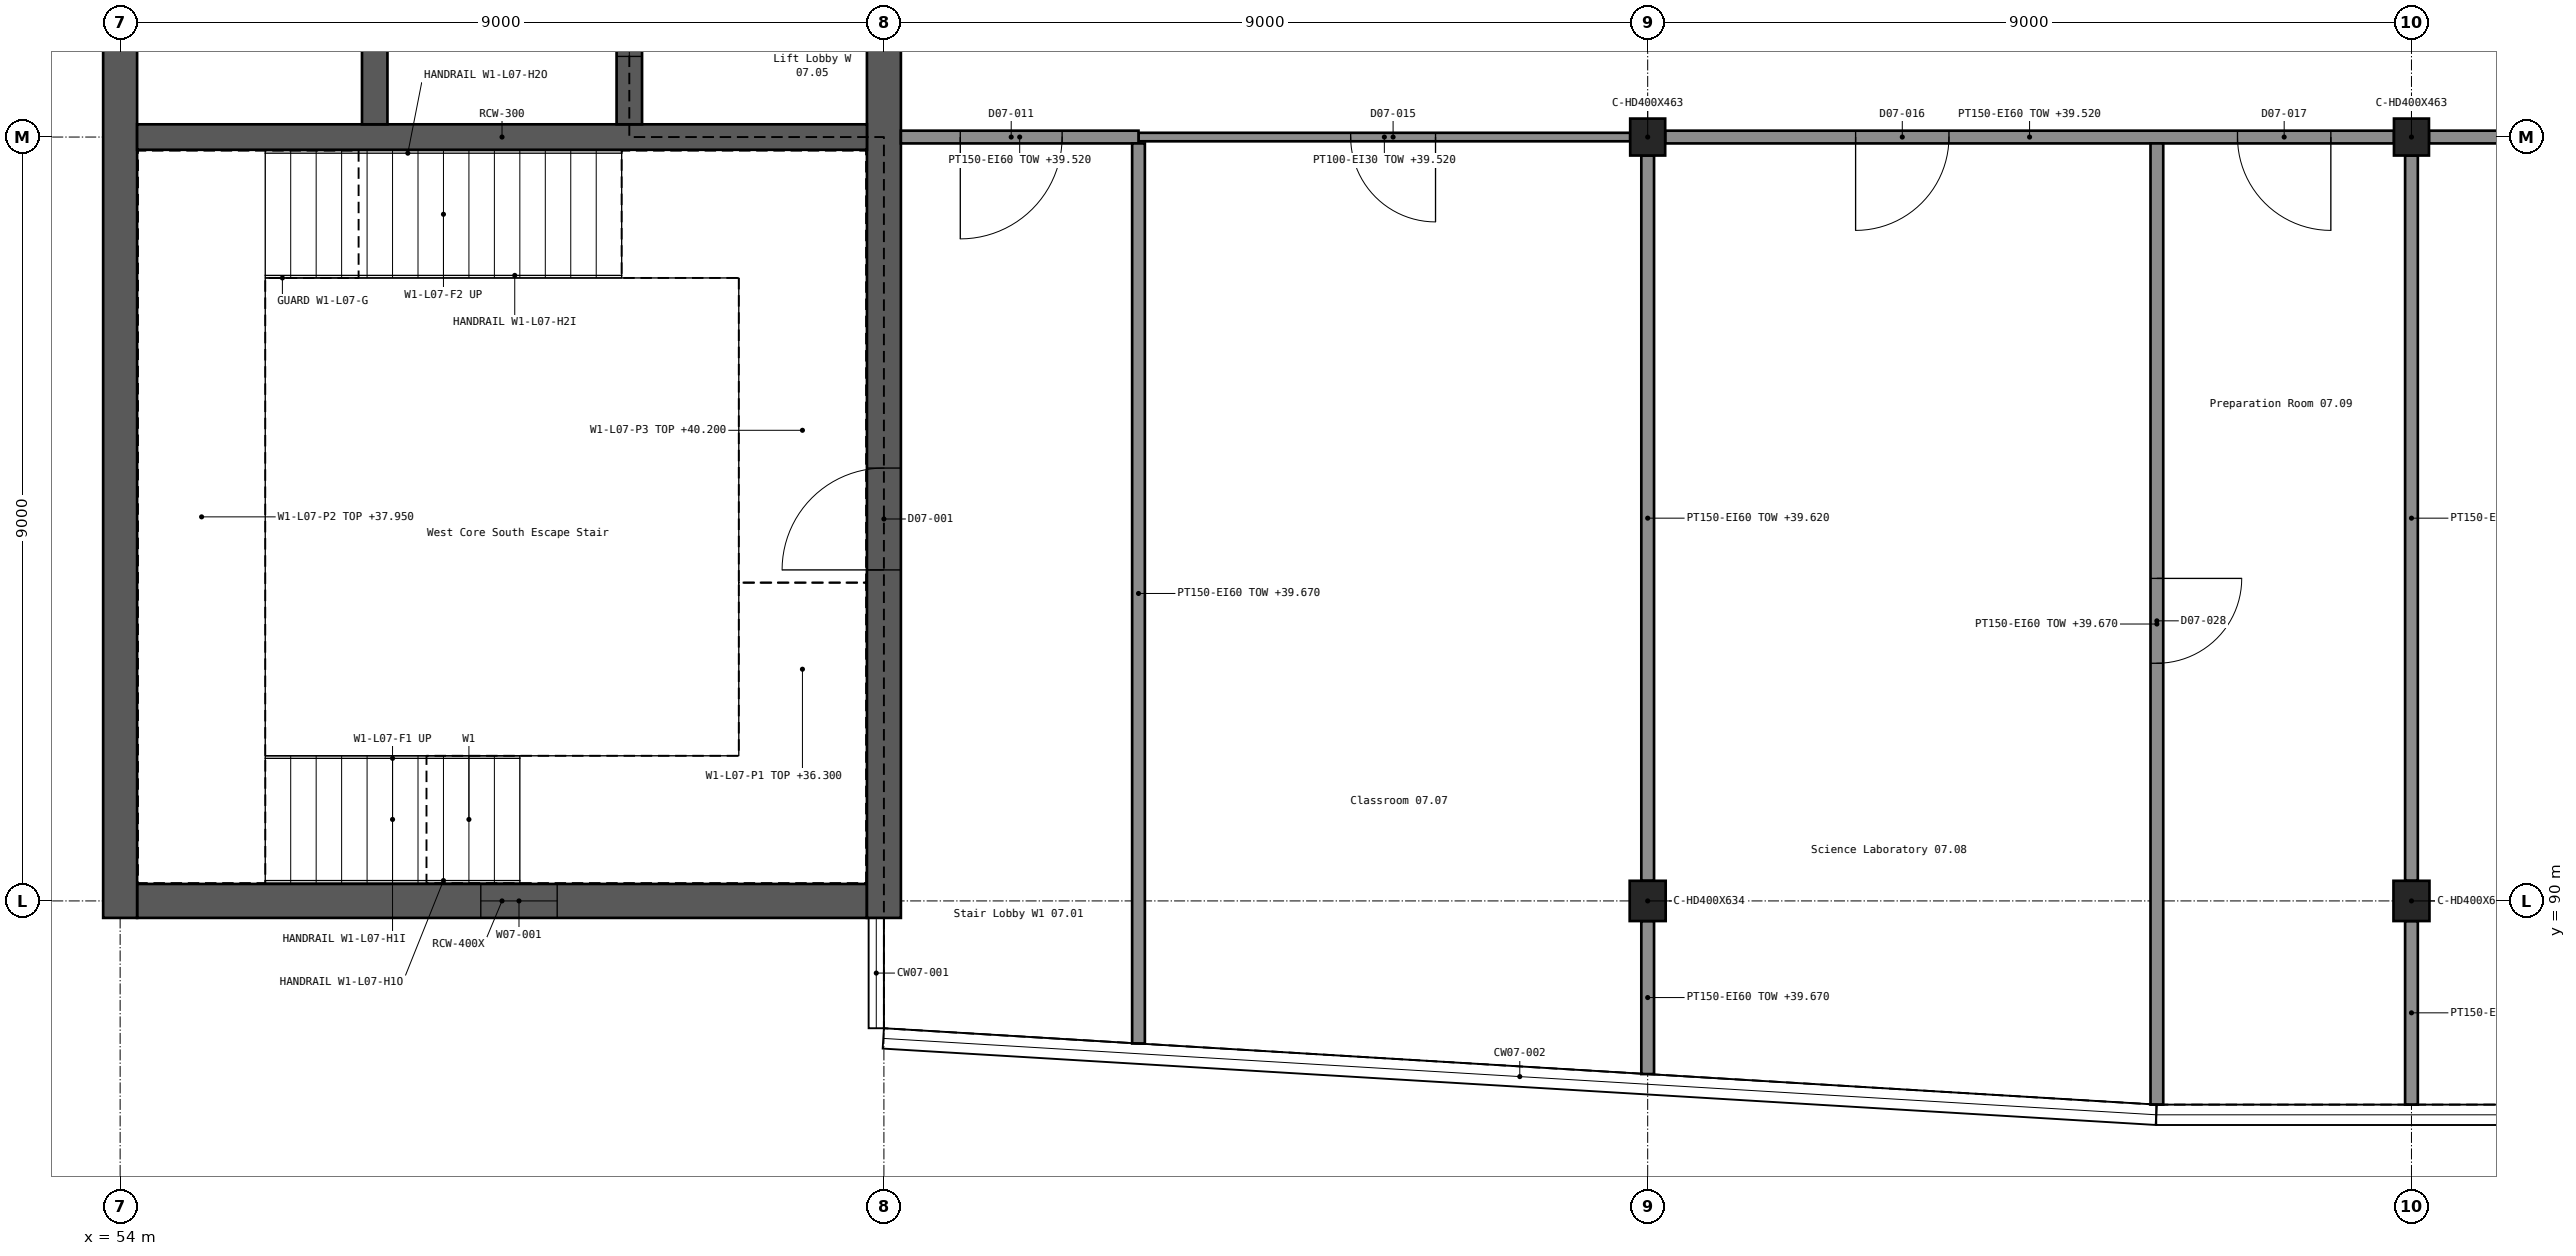
"""IFC4 building model, lengths in metres.
Left out: names, types, materials, properties, quantities, classifications, styles, units other than length and angle.
Written with IfcOpenShell. Run it as: python <this file> out.ifc"""

import sys

from ifc_helpers import new_model, si_unit, direction, frame, frame_2d, origin, origin_2d, place, context, subcontext, project, spatial, rectangle, i_section, extrude, element, fill, save


model = new_model("IFC4")
c1 = context("Model", 3, precision=1e-05, world=origin(), true_north=direction((0.0, 1.0)))
c2 = subcontext(c1, "Body", "Model", "MODEL_VIEW")
j1 = project(units=[si_unit("LENGTHUNIT", "METRE"), si_unit("PLANEANGLEUNIT", "RADIAN")], contexts=[c1])
p1 = place(None, origin())
s1 = spatial("IfcSite", under=j1, at=p1, CompositionType="ELEMENT")
p2 = place(p1, origin())
s2 = spatial("IfcBuilding", under=s1, at=p2, CompositionType="ELEMENT")
p3 = place(p2, frame((0.0, 0.0, 36.3)))
s3 = spatial("IfcBuildingStorey", under=s2, at=p3, CompositionType="ELEMENT", Elevation=36.3)
p4 = place(p3, frame((54.2, 90.0, 0.0), z_axis=(0.0, 0.0, 1.0), x_axis=(1.0, 0.0, 0.0)))
e1 = element("IfcWall", 1, at=p4, inside=s3, PredefinedType="SHEAR", context=c2, shape_type="SweptSolid", body=[
    extrude(rectangle(XDim=8.6, YDim=0.4, at=frame_2d((4.3, 0.0))), origin(), (0.0, 0.0, 1.0), 3.9),
])
p5 = place(p4, frame((4.05, 0.0, 1.2)))
e2 = element("IfcOpeningElement", 2, at=p5, cuts=e1, PredefinedType="OPENING", context=c2, shape_type="SweptSolid", body=[
    extrude(rectangle(XDim=0.9, YDim=1.5, at=frame_2d((0.45, 0.75))), frame((0.0, 0.211, 0.0), z_axis=(0.0, -1.0, 0.0), x_axis=(1.0, 0.0, 0.0)), (0.0, 0.0, 1.0), 0.422),
])
p6 = place(p3, frame((54.0, 89.8, 0.0), z_axis=(0.0, 0.0, 1.0), x_axis=(0.0, 1.0, 0.0)))
e3 = element("IfcWall", 3, at=p6, inside=s3, PredefinedType="SHEAR", context=c2, shape_type="SweptSolid", body=[
    extrude(rectangle(XDim=27.4, YDim=0.4, at=frame_2d((13.7, 0.0))), origin(), (0.0, 0.0, 1.0), 3.9),
])
p7 = place(p3, frame((63.0, 89.8, 0.0), z_axis=(0.0, 0.0, 1.0), x_axis=(0.0, 1.0, 0.0)))
e4 = element("IfcWall", 4, at=p7, inside=s3, PredefinedType="SHEAR", context=c2, shape_type="SweptSolid", body=[
    extrude(rectangle(XDim=27.4, YDim=0.4, at=frame_2d((13.7, 0.0))), origin(), (0.0, 0.0, 1.0), 3.9),
])
p8 = place(p7, frame((4.1, 0.0, 0.0)))
e5 = element("IfcOpeningElement", 5, at=p8, cuts=e4, PredefinedType="OPENING", context=c2, shape_type="SweptSolid", body=[
    extrude(rectangle(XDim=1.2, YDim=2.1, at=frame_2d((0.6, 1.05))), frame((0.0, 0.211, 0.0), z_axis=(0.0, -1.0, 0.0), x_axis=(1.0, 0.0, 0.0)), (0.0, 0.0, 1.0), 0.422),
])
p9 = place(p7, frame((22.1, 0.0, 0.0)))
e6 = element("IfcOpeningElement", 6, at=p9, cuts=e4, PredefinedType="OPENING", context=c2, shape_type="SweptSolid", body=[
    extrude(rectangle(XDim=1.2, YDim=2.1, at=frame_2d((0.6, 1.05))), frame((0.0, 0.211, 0.0), z_axis=(0.0, -1.0, 0.0), x_axis=(1.0, 0.0, 0.0)), (0.0, 0.0, 1.0), 0.422),
])
p10 = place(p7, frame((12.5, 0.0, 0.0)))
e7 = element("IfcOpeningElement", 7, at=p10, cuts=e4, PredefinedType="OPENING", context=c2, shape_type="SweptSolid", body=[
    extrude(rectangle(XDim=2.0, YDim=2.1, at=frame_2d((1.0, 1.05))), frame((0.0, 0.211, 0.0), z_axis=(0.0, -1.0, 0.0), x_axis=(1.0, 0.0, 0.0)), (0.0, 0.0, 1.0), 0.422),
])
p11 = place(p3, frame((54.2, 99.0, 0.0), z_axis=(0.0, 0.0, 1.0), x_axis=(1.0, 0.0, 0.0)))
e8 = element("IfcWall", 8, at=p11, inside=s3, PredefinedType="SHEAR", context=c2, shape_type="SweptSolid", body=[
    extrude(rectangle(XDim=8.6, YDim=0.3, at=frame_2d((4.3, 0.0))), origin(), (0.0, 0.0, 1.0), 3.9),
])
p12 = place(p3, frame((57.0, 99.15, 0.0), z_axis=(0.0, 0.0, 1.0), x_axis=(0.0, 1.0, 0.0)))
e9 = element("IfcWall", 9, at=p12, inside=s3, PredefinedType="SHEAR", context=c2, shape_type="SweptSolid", body=[
    extrude(rectangle(XDim=8.7, YDim=0.3, at=frame_2d((4.35, 0.0))), origin(), (0.0, 0.0, 1.0), 3.9),
])
p13 = place(p3, frame((60.0, 99.15, 0.0), z_axis=(0.0, 0.0, 1.0), x_axis=(0.0, 1.0, 0.0)))
e10 = element("IfcWall", 10, at=p13, inside=s3, PredefinedType="SHEAR", context=c2, shape_type="SweptSolid", body=[
    extrude(rectangle(XDim=8.7, YDim=0.3, at=frame_2d((4.35, 0.0))), origin(), (0.0, 0.0, 1.0), 3.9),
])
p14 = place(p13, frame((0.8, 0.0, 0.0)))
e11 = element("IfcOpeningElement", 11, at=p14, cuts=e10, PredefinedType="OPENING", context=c2, shape_type="SweptSolid", body=[
    extrude(rectangle(XDim=1.1, YDim=2.1, at=frame_2d((0.55, 1.05))), frame((0.0, 0.161, 0.0), z_axis=(0.0, -1.0, 0.0), x_axis=(1.0, 0.0, 0.0)), (0.0, 0.0, 1.0), 0.322),
])
p15 = place(p13, frame((3.8, 0.0, 0.0)))
e12 = element("IfcOpeningElement", 12, at=p15, cuts=e10, PredefinedType="OPENING", context=c2, shape_type="SweptSolid", body=[
    extrude(rectangle(XDim=1.1, YDim=2.1, at=frame_2d((0.55, 1.05))), frame((0.0, 0.161, 0.0), z_axis=(0.0, -1.0, 0.0), x_axis=(1.0, 0.0, 0.0)), (0.0, 0.0, 1.0), 0.322),
])
p16 = place(p13, frame((6.8, 0.0, 0.0)))
e13 = element("IfcOpeningElement", 13, at=p16, cuts=e10, PredefinedType="OPENING", context=c2, shape_type="SweptSolid", body=[
    extrude(rectangle(XDim=1.1, YDim=2.1, at=frame_2d((0.55, 1.05))), frame((0.0, 0.161, 0.0), z_axis=(0.0, -1.0, 0.0), x_axis=(1.0, 0.0, 0.0)), (0.0, 0.0, 1.0), 0.322),
])
for number, where, z_axis, x_axis in (
    (14, (72.0, 90.0, 0.0), (0.0, 0.0, 1.0), (1.0, 0.0, 0.0)),
    (15, (81.0, 90.0, 0.0), (0.0, 0.0, 1.0), (1.0, 0.0, 0.0)),
):
    element("IfcColumn", number, at=place(p3, frame(where, z_axis=z_axis, x_axis=x_axis)), inside=s3, PredefinedType="COLUMN", context=c2, shape_type="SweptSolid", body=[
        extrude(i_section(OverallWidth=0.424, OverallDepth=0.474, WebThickness=0.048, FlangeThickness=0.077, FilletRadius=0.015, at=origin_2d()), origin(), (0.0, 0.0, 1.0), 3.9),
    ])
for number, where, z_axis, x_axis in (
    (16, (72.0, 99.0, 0.0), (0.0, 0.0, 1.0), (1.0, 0.0, 0.0)),
    (17, (81.0, 99.0, 0.0), (0.0, 0.0, 1.0), (1.0, 0.0, 0.0)),
):
    element("IfcColumn", number, at=place(p3, frame(where, z_axis=z_axis, x_axis=x_axis)), inside=s3, PredefinedType="COLUMN", context=c2, shape_type="SweptSolid", body=[
        extrude(i_section(OverallWidth=0.412, OverallDepth=0.435, WebThickness=0.036, FlangeThickness=0.057, FilletRadius=0.015, at=origin_2d()), origin(), (0.0, 0.0, 1.0), 3.9),
    ])
p17 = place(p3, frame((66.0, 99.0, 0.0), z_axis=(0.0, 0.0, 1.0), x_axis=(1.0, 0.0, 0.0)))
e18 = element("IfcWall", 18, at=p17, inside=s3, PredefinedType="PARTITIONING", context=c2, shape_type="SweptSolid", body=[
    extrude(rectangle(XDim=5.794, YDim=0.1, at=frame_2d((2.897, 0.0))), origin(), (0.0, 0.0, 1.0), 3.22),
])
p18 = place(p17, frame((2.5, 0.0, 0.0)))
e19 = element("IfcOpeningElement", 19, at=p18, cuts=e18, PredefinedType="OPENING", context=c2, shape_type="SweptSolid", body=[
    extrude(rectangle(XDim=1.0, YDim=2.1, at=frame_2d((0.5, 1.05))), frame((0.0, 0.061, 0.0), z_axis=(0.0, -1.0, 0.0), x_axis=(1.0, 0.0, 0.0)), (0.0, 0.0, 1.0), 0.122),
])
p19 = place(p3, frame((63.2, 99.0, 0.0), z_axis=(0.0, 0.0, 1.0), x_axis=(1.0, 0.0, 0.0)))
e20 = element("IfcWall", 20, at=p19, inside=s3, PredefinedType="PARTITIONING", context=c2, shape_type="SweptSolid", body=[
    extrude(rectangle(XDim=2.8, YDim=0.15, at=frame_2d((1.4, 0.0))), origin(), (0.0, 0.0, 1.0), 3.22),
])
p20 = place(p19, frame((0.7, 0.0, 0.0)))
e21 = element("IfcOpeningElement", 21, at=p20, cuts=e20, PredefinedType="OPENING", context=c2, shape_type="SweptSolid", body=[
    extrude(rectangle(XDim=1.2, YDim=2.1, at=frame_2d((0.6, 1.05))), frame((0.0, 0.086, 0.0), z_axis=(0.0, -1.0, 0.0), x_axis=(1.0, 0.0, 0.0)), (0.0, 0.0, 1.0), 0.172),
])
p21 = place(p3, frame((72.206, 99.0, 0.0), z_axis=(0.0, 0.0, 1.0), x_axis=(1.0, 0.0, 0.0)))
e22 = element("IfcWall", 22, at=p21, inside=s3, PredefinedType="PARTITIONING", context=c2, shape_type="SweptSolid", body=[
    extrude(rectangle(XDim=8.588, YDim=0.15, at=frame_2d((4.294, 0.0))), origin(), (0.0, 0.0, 1.0), 3.22),
])
p22 = place(p21, frame((2.244, 0.0, 0.0)))
e23 = element("IfcOpeningElement", 23, at=p22, cuts=e22, PredefinedType="OPENING", context=c2, shape_type="SweptSolid", body=[
    extrude(rectangle(XDim=1.1, YDim=2.4, at=frame_2d((0.55, 1.2))), frame((0.0, 0.086, 0.0), z_axis=(0.0, -1.0, 0.0), x_axis=(1.0, 0.0, 0.0)), (0.0, 0.0, 1.0), 0.172),
])
p23 = place(p21, frame((6.744, 0.0, 0.0)))
e24 = element("IfcOpeningElement", 24, at=p23, cuts=e22, PredefinedType="OPENING", context=c2, shape_type="SweptSolid", body=[
    extrude(rectangle(XDim=1.1, YDim=2.4, at=frame_2d((0.55, 1.2))), frame((0.0, 0.086, 0.0), z_axis=(0.0, -1.0, 0.0), x_axis=(1.0, 0.0, 0.0)), (0.0, 0.0, 1.0), 0.172),
])
p24 = place(p3, frame((81.206, 99.0, 0.0), z_axis=(0.0, 0.0, 1.0), x_axis=(1.0, 0.0, 0.0)))
e25 = element("IfcWall", 25, at=p24, inside=s3, PredefinedType="PARTITIONING", context=c2, shape_type="SweptSolid", body=[
    extrude(rectangle(XDim=8.588, YDim=0.15, at=frame_2d((4.294, 0.0))), origin(), (0.0, 0.0, 1.0), 3.22),
])
p25 = place(p24, frame((1.369, 0.0, 0.0)))
e26 = element("IfcOpeningElement", 26, at=p25, cuts=e25, PredefinedType="OPENING", context=c2, shape_type="SweptSolid", body=[
    extrude(rectangle(XDim=1.1, YDim=2.4, at=frame_2d((0.55, 1.2))), frame((0.0, 0.086, 0.0), z_axis=(0.0, -1.0, 0.0), x_axis=(1.0, 0.0, 0.0)), (0.0, 0.0, 1.0), 0.172),
])
p26 = place(p24, frame((6.744, 0.0, 0.0)))
e27 = element("IfcOpeningElement", 27, at=p26, cuts=e25, PredefinedType="OPENING", context=c2, shape_type="SweptSolid", body=[
    extrude(rectangle(XDim=1.1, YDim=2.4, at=frame_2d((0.55, 1.2))), frame((0.0, 0.086, 0.0), z_axis=(0.0, -1.0, 0.0), x_axis=(1.0, 0.0, 0.0)), (0.0, 0.0, 1.0), 0.172),
])
p27 = place(p3, frame((66.0, 88.32, 0.0), z_axis=(0.0, 0.0, 1.0), x_axis=(0.0, 1.0, 0.0)))
e28 = element("IfcWall", 28, at=p27, inside=s3, PredefinedType="PARTITIONING", context=c2, shape_type="SweptSolid", body=[
    extrude(rectangle(XDim=10.605, YDim=0.15, at=frame_2d((5.302, 0.0))), origin(), (0.0, 0.0, 1.0), 3.37),
])
p28 = place(p3, frame((72.0, 87.96, 0.0), z_axis=(0.0, 0.0, 1.0), x_axis=(0.0, 1.0, 0.0)))
e29 = element("IfcWall", 29, at=p28, inside=s3, PredefinedType="PARTITIONING", context=c2, shape_type="SweptSolid", body=[
    extrude(rectangle(XDim=1.803, YDim=0.15, at=frame_2d((0.901, 0.0))), origin(), (0.0, 0.0, 1.0), 3.37),
])
p29 = place(p3, frame((72.0, 90.237, 0.0), z_axis=(0.0, 0.0, 1.0), x_axis=(0.0, 1.0, 0.0)))
e30 = element("IfcWall", 30, at=p29, inside=s3, PredefinedType="PARTITIONING", context=c2, shape_type="SweptSolid", body=[
    extrude(rectangle(XDim=8.545, YDim=0.15, at=frame_2d((4.273, 0.0))), origin(), (0.0, 0.0, 1.0), 3.32),
])
p30 = place(p3, frame((78.0, 87.6, 0.0), z_axis=(0.0, 0.0, 1.0), x_axis=(0.0, 1.0, 0.0)))
e31 = element("IfcWall", 31, at=p30, inside=s3, PredefinedType="PARTITIONING", context=c2, shape_type="SweptSolid", body=[
    extrude(rectangle(XDim=11.325, YDim=0.15, at=frame_2d((5.663, 0.0))), origin(), (0.0, 0.0, 1.0), 3.37),
])
p31 = place(p30, frame((5.2, 0.0, 0.0)))
e32 = element("IfcOpeningElement", 32, at=p31, cuts=e31, PredefinedType="OPENING", context=c2, shape_type="SweptSolid", body=[
    extrude(rectangle(XDim=1.0, YDim=2.1, at=frame_2d((0.5, 1.05))), frame((0.0, 0.086, 0.0), z_axis=(0.0, -1.0, 0.0), x_axis=(1.0, 0.0, 0.0)), (0.0, 0.0, 1.0), 0.172),
])
p32 = place(p3, frame((81.0, 87.6, 0.0), z_axis=(0.0, 0.0, 1.0), x_axis=(0.0, 1.0, 0.0)))
e33 = element("IfcWall", 33, at=p32, inside=s3, PredefinedType="PARTITIONING", context=c2, shape_type="SweptSolid", body=[
    extrude(rectangle(XDim=2.163, YDim=0.15, at=frame_2d((1.082, 0.0))), origin(), (0.0, 0.0, 1.0), 3.37),
])
p33 = place(p3, frame((81.0, 90.237, 0.0), z_axis=(0.0, 0.0, 1.0), x_axis=(0.0, 1.0, 0.0)))
e34 = element("IfcWall", 34, at=p33, inside=s3, PredefinedType="PARTITIONING", context=c2, shape_type="SweptSolid", body=[
    extrude(rectangle(XDim=8.545, YDim=0.15, at=frame_2d((4.273, 0.0))), origin(), (0.0, 0.0, 1.0), 3.32),
])
p34 = place(p5, origin())
e35 = element("IfcWindow", 35, at=p34, inside=s3, PartitioningType="SINGLE_PANEL", PredefinedType="WINDOW", context=c2, shape_type="SweptSolid", body=[
    extrude(rectangle(XDim=0.9, YDim=1.5, at=frame_2d((0.45, 0.75))), frame((0.0, 0.03, 0.0), z_axis=(0.0, -1.0, 0.0), x_axis=(1.0, 0.0, 0.0)), (0.0, 0.0, 1.0), 0.06),
])
fill(e2, e35)
p35 = place(p8, origin())
e36 = element("IfcDoor", 36, at=p35, inside=s3, OperationType="SINGLE_SWING_LEFT", PredefinedType="DOOR", context=c2, shape_type="SweptSolid", body=[
    extrude(rectangle(XDim=1.2, YDim=2.1, at=frame_2d((0.6, 1.05))), frame((0.0, 0.025, 0.0), z_axis=(0.0, -1.0, 0.0), x_axis=(1.0, 0.0, 0.0)), (0.0, 0.0, 1.0), 0.05),
])
fill(e5, e36)
p36 = place(p14, origin())
e37 = element("IfcDoor", 37, at=p36, inside=s3, OperationType="DOUBLE_DOOR_SLIDING", PredefinedType="DOOR", context=c2, shape_type="SweptSolid", body=[
    extrude(rectangle(XDim=1.1, YDim=2.1, at=frame_2d((0.55, 1.05))), frame((0.0, 0.025, 0.0), z_axis=(0.0, -1.0, 0.0), x_axis=(1.0, 0.0, 0.0)), (0.0, 0.0, 1.0), 0.05),
])
fill(e11, e37)
p37 = place(p20, frame((1.2, 0.0, 0.0), z_axis=(0.0, 0.0, 1.0), x_axis=(-1.0, 0.0, 0.0)))
e38 = element("IfcDoor", 38, at=p37, inside=s3, OperationType="SINGLE_SWING_RIGHT", PredefinedType="DOOR", context=c2, shape_type="SweptSolid", body=[
    extrude(rectangle(XDim=1.2, YDim=2.1, at=frame_2d((0.6, 1.05))), frame((0.0, 0.025, 0.0), z_axis=(0.0, -1.0, 0.0), x_axis=(1.0, 0.0, 0.0)), (0.0, 0.0, 1.0), 0.05),
])
fill(e21, e38)
p38 = place(p18, frame((1.0, 0.0, 0.0), z_axis=(0.0, 0.0, 1.0), x_axis=(-1.0, 0.0, 0.0)))
e39 = element("IfcDoor", 39, at=p38, inside=s3, OperationType="SINGLE_SWING_LEFT", PredefinedType="DOOR", context=c2, shape_type="SweptSolid", body=[
    extrude(rectangle(XDim=1.0, YDim=2.1, at=frame_2d((0.5, 1.05))), frame((0.0, 0.025, 0.0), z_axis=(0.0, -1.0, 0.0), x_axis=(1.0, 0.0, 0.0)), (0.0, 0.0, 1.0), 0.05),
])
fill(e19, e39)
p39 = place(p22, frame((1.1, 0.0, 0.0), z_axis=(0.0, 0.0, 1.0), x_axis=(-1.0, 0.0, 0.0)))
e40 = element("IfcDoor", 40, at=p39, inside=s3, OperationType="SINGLE_SWING_RIGHT", PredefinedType="DOOR", context=c2, shape_type="SweptSolid", body=[
    extrude(rectangle(XDim=1.1, YDim=2.4, at=frame_2d((0.55, 1.2))), frame((0.0, 0.025, 0.0), z_axis=(0.0, -1.0, 0.0), x_axis=(1.0, 0.0, 0.0)), (0.0, 0.0, 1.0), 0.05),
])
fill(e23, e40)
p40 = place(p23, frame((1.1, 0.0, 0.0), z_axis=(0.0, 0.0, 1.0), x_axis=(-1.0, 0.0, 0.0)))
e41 = element("IfcDoor", 41, at=p40, inside=s3, OperationType="SINGLE_SWING_LEFT", PredefinedType="DOOR", context=c2, shape_type="SweptSolid", body=[
    extrude(rectangle(XDim=1.1, YDim=2.4, at=frame_2d((0.55, 1.2))), frame((0.0, 0.025, 0.0), z_axis=(0.0, -1.0, 0.0), x_axis=(1.0, 0.0, 0.0)), (0.0, 0.0, 1.0), 0.05),
])
fill(e24, e41)
p41 = place(p31, frame((1.0, 0.0, 0.0), z_axis=(0.0, 0.0, 1.0), x_axis=(-1.0, 0.0, 0.0)))
e42 = element("IfcDoor", 42, at=p41, inside=s3, OperationType="SINGLE_SWING_LEFT", PredefinedType="DOOR", context=c2, shape_type="SweptSolid", body=[
    extrude(rectangle(XDim=1.0, YDim=2.1, at=frame_2d((0.5, 1.05))), frame((0.0, 0.025, 0.0), z_axis=(0.0, -1.0, 0.0), x_axis=(1.0, 0.0, 0.0)), (0.0, 0.0, 1.0), 0.05),
])
fill(e32, e42)
save(model, sys.argv[1])
